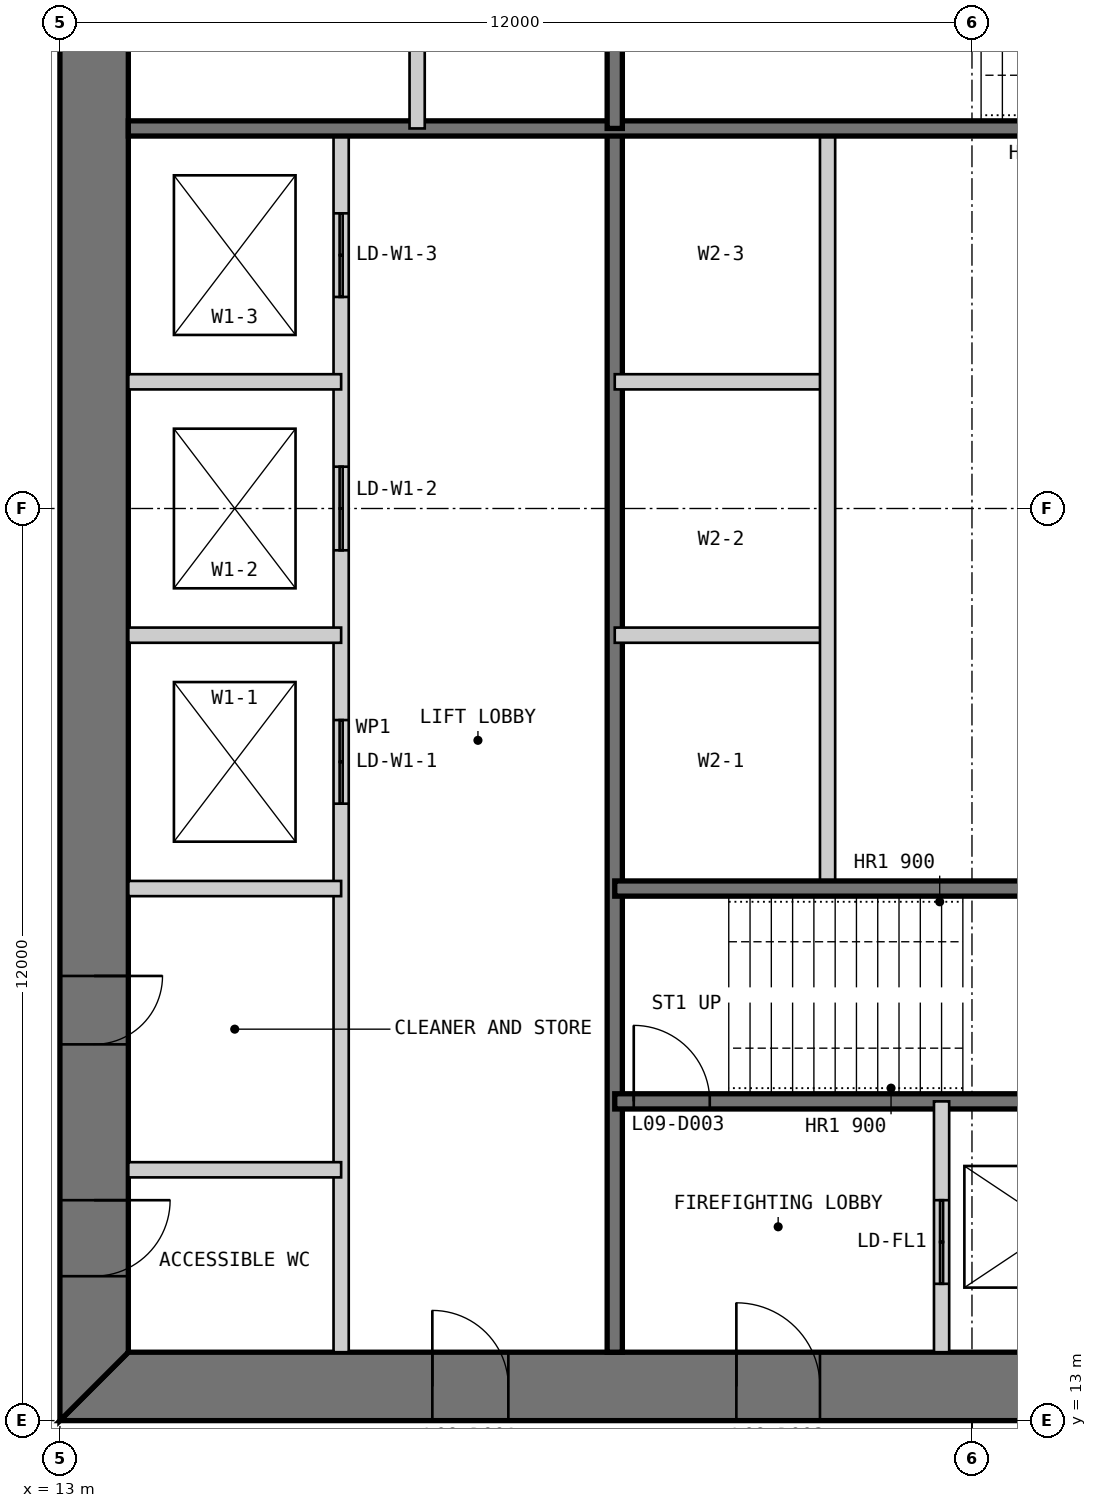
"""IFC4 building model, lengths in metres.
Left out: names, types, materials, properties, quantities, classifications, styles, units other than length and angle.
Written with IfcOpenShell. Run it as: python <this file> out.ifc"""

import sys

from ifc_helpers import new_model, si_unit, direction, frame, frame_2d, origin, place, context, subcontext, project, spatial, polyline, rectangle, outline, extrude, element, fill, save


model = new_model("IFC4")
c1 = context("Model", 3, precision=1e-05, world=origin(), true_north=direction((0.0, 1.0)))
c2 = subcontext(c1, "Body", "Model", "MODEL_VIEW")
j1 = project(units=[si_unit("LENGTHUNIT", "METRE"), si_unit("PLANEANGLEUNIT", "RADIAN")], contexts=[c1])
p1 = place(None, origin())
s1 = spatial("IfcSite", under=j1, at=p1, CompositionType="ELEMENT")
p2 = place(p1, origin())
s2 = spatial("IfcBuilding", under=s1, at=p2, CompositionType="ELEMENT")
p3 = place(p2, frame((0.0, 0.0, 43.0)))
s3 = spatial("IfcBuildingStorey", under=s2, at=p3, CompositionType="ELEMENT", Elevation=43.0)
p4 = place(p3, frame((13.0, 13.45, 0.0), z_axis=(0.0, 0.0, 1.0), x_axis=(1.0, 0.0, 0.0)))
e1 = element("IfcWall", 1, at=p4, inside=s3, PredefinedType="SHEAR", context=c2, shape_type="SweptSolid", body=[
    extrude(outline(polyline([(0.0, -0.45), (24.0, -0.45), (23.1, 0.45), (0.9, 0.45), (0.0, -0.45)])), origin(), (0.0, 0.0, 1.0), 4.0),
])
p5 = place(p4, frame((4.9, 0.0, 0.0)))
e2 = element("IfcOpeningElement", 2, at=p5, cuts=e1, PredefinedType="OPENING", context=c2, shape_type="SweptSolid", body=[
    extrude(rectangle(XDim=1.0, YDim=2.2, at=frame_2d((0.5, 1.1))), frame((0.0, 0.46, 0.0), z_axis=(0.0, -1.0, 0.0), x_axis=(1.0, 0.0, 0.0)), (0.0, 0.0, 1.0), 0.92),
])
p6 = place(p4, frame((8.9, 0.0, 0.0)))
e3 = element("IfcOpeningElement", 3, at=p6, cuts=e1, PredefinedType="OPENING", context=c2, shape_type="SweptSolid", body=[
    extrude(rectangle(XDim=1.1, YDim=2.2, at=frame_2d((0.55, 1.1))), frame((0.0, 0.46, 0.0), z_axis=(0.0, -1.0, 0.0), x_axis=(1.0, 0.0, 0.0)), (0.0, 0.0, 1.0), 0.92),
])
p7 = place(p4, frame((15.05, 0.0, 0.0)))
e4 = element("IfcOpeningElement", 4, at=p7, cuts=e1, PredefinedType="OPENING", context=c2, shape_type="SweptSolid", body=[
    extrude(rectangle(XDim=0.9, YDim=2.2, at=frame_2d((0.45, 1.1))), frame((0.0, 0.46, 0.0), z_axis=(0.0, -1.0, 0.0), x_axis=(1.0, 0.0, 0.0)), (0.0, 0.0, 1.0), 0.92),
])
p8 = place(p4, frame((17.9, 0.0, 0.0)))
e5 = element("IfcOpeningElement", 5, at=p8, cuts=e1, PredefinedType="OPENING", context=c2, shape_type="SweptSolid", body=[
    extrude(rectangle(XDim=1.0, YDim=2.2, at=frame_2d((0.5, 1.1))), frame((0.0, 0.46, 0.0), z_axis=(0.0, -1.0, 0.0), x_axis=(1.0, 0.0, 0.0)), (0.0, 0.0, 1.0), 0.92),
])
p9 = place(p4, frame((21.4, 0.0, 0.0)))
e6 = element("IfcOpeningElement", 6, at=p9, cuts=e1, PredefinedType="OPENING", context=c2, shape_type="SweptSolid", body=[
    extrude(rectangle(XDim=1.0, YDim=2.2, at=frame_2d((0.5, 1.1))), frame((0.0, 0.46, 0.0), z_axis=(0.0, -1.0, 0.0), x_axis=(1.0, 0.0, 0.0)), (0.0, 0.0, 1.0), 0.92),
])
p10 = place(p3, frame((13.45, 36.1, 0.0), z_axis=(0.0, 0.0, 1.0), x_axis=(0.0, -1.0, 0.0)))
e7 = element("IfcWall", 7, at=p10, inside=s3, PredefinedType="SHEAR", context=c2, shape_type="SweptSolid", body=[
    extrude(outline(polyline([(-0.9, -0.45), (23.1, -0.45), (22.2, 0.45), (0.0, 0.45), (-0.9, -0.45)])), origin(), (0.0, 0.0, 1.0), 4.0),
])
p11 = place(p10, frame((20.2, 0.0, 0.0)))
e8 = element("IfcOpeningElement", 8, at=p11, cuts=e7, PredefinedType="OPENING", context=c2, shape_type="SweptSolid", body=[
    extrude(rectangle(XDim=1.0, YDim=2.2, at=frame_2d((0.5, 1.1))), frame((0.0, 0.46, 0.0), z_axis=(0.0, -1.0, 0.0), x_axis=(1.0, 0.0, 0.0)), (0.0, 0.0, 1.0), 0.92),
])
p12 = place(p10, frame((17.25, 0.0, 0.0)))
e9 = element("IfcOpeningElement", 9, at=p12, cuts=e7, PredefinedType="OPENING", context=c2, shape_type="SweptSolid", body=[
    extrude(rectangle(XDim=0.9, YDim=2.2, at=frame_2d((0.45, 1.1))), frame((0.0, 0.46, 0.0), z_axis=(0.0, -1.0, 0.0), x_axis=(1.0, 0.0, 0.0)), (0.0, 0.0, 1.0), 0.92),
])
p13 = place(p3, frame((16.7, 13.9, 0.0), z_axis=(0.0, 0.0, 1.0), x_axis=(0.0, 1.0, 0.0)))
e10 = element("IfcWall", 10, at=p13, inside=s3, PredefinedType="PARTITIONING", context=c2, shape_type="SweptSolid", body=[
    extrude(rectangle(XDim=16.1, YDim=0.2, at=frame_2d((8.05, 0.0))), origin(), (0.0, 0.0, 1.0), 3.8),
])
p14 = place(p13, frame((7.217, 0.0, 0.0)))
e11 = element("IfcOpeningElement", 11, at=p14, cuts=e10, PredefinedType="OPENING", context=c2, shape_type="SweptSolid", body=[
    extrude(rectangle(XDim=1.1, YDim=2.2, at=frame_2d((0.55, 1.1))), frame((0.0, 0.11, 0.0), z_axis=(0.0, -1.0, 0.0), x_axis=(1.0, 0.0, 0.0)), (0.0, 0.0, 1.0), 0.22),
])
p15 = place(p13, frame((10.55, 0.0, 0.0)))
e12 = element("IfcOpeningElement", 12, at=p15, cuts=e10, PredefinedType="OPENING", context=c2, shape_type="SweptSolid", body=[
    extrude(rectangle(XDim=1.1, YDim=2.2, at=frame_2d((0.55, 1.1))), frame((0.0, 0.11, 0.0), z_axis=(0.0, -1.0, 0.0), x_axis=(1.0, 0.0, 0.0)), (0.0, 0.0, 1.0), 0.22),
])
p16 = place(p13, frame((13.883, 0.0, 0.0)))
e13 = element("IfcOpeningElement", 13, at=p16, cuts=e10, PredefinedType="OPENING", context=c2, shape_type="SweptSolid", body=[
    extrude(rectangle(XDim=1.1, YDim=2.2, at=frame_2d((0.55, 1.1))), frame((0.0, 0.11, 0.0), z_axis=(0.0, -1.0, 0.0), x_axis=(1.0, 0.0, 0.0)), (0.0, 0.0, 1.0), 0.22),
])
p17 = place(p3, frame((20.3, 13.9, 0.0), z_axis=(0.0, 0.0, 1.0), x_axis=(0.0, 1.0, 0.0)))
e14 = element("IfcWall", 14, at=p17, inside=s3, PredefinedType="SOLIDWALL", context=c2, shape_type="SweptSolid", body=[
    extrude(rectangle(XDim=16.1, YDim=0.2, at=frame_2d((8.05, 0.0))), origin(), (0.0, 0.0, 1.0), 3.8),
])
for number, where, z_axis, x_axis in (
    (15, (13.9, 20.0, 0.0), (0.0, 0.0, 1.0), (1.0, 0.0, 0.0)),
    (16, (13.9, 23.333, 0.0), (0.0, 0.0, 1.0), (1.0, 0.0, 0.0)),
    (17, (13.9, 26.667, 0.0), (0.0, 0.0, 1.0), (1.0, 0.0, 0.0)),
    (18, (20.3, 23.333, 0.0), (0.0, 0.0, 1.0), (1.0, 0.0, 0.0)),
    (19, (20.3, 26.667, 0.0), (0.0, 0.0, 1.0), (1.0, 0.0, 0.0)),
):
    element("IfcWall", number, at=place(p3, frame(where, z_axis=z_axis, x_axis=x_axis)), inside=s3, PredefinedType="PARTITIONING", context=c2, shape_type="SweptSolid", body=[
        extrude(rectangle(XDim=2.8, YDim=0.2, at=frame_2d((1.4, 0.0))), origin(), (0.0, 0.0, 1.0), 3.8),
    ])
p18 = place(p3, frame((23.1, 20.0, 0.0), z_axis=(0.0, 0.0, 1.0), x_axis=(0.0, 1.0, 0.0)))
e20 = element("IfcWall", 20, at=p18, inside=s3, PredefinedType="PARTITIONING", context=c2, shape_type="SweptSolid", body=[
    extrude(rectangle(XDim=10.0, YDim=0.2, at=frame_2d((5.0, 0.0))), origin(), (0.0, 0.0, 1.0), 3.8),
])
p19 = place(p3, frame((20.3, 17.2, 0.0), z_axis=(0.0, 0.0, 1.0), x_axis=(1.0, 0.0, 0.0)))
e21 = element("IfcWall", 21, at=p19, inside=s3, PredefinedType="SOLIDWALL", context=c2, shape_type="SweptSolid", body=[
    extrude(rectangle(XDim=9.4, YDim=0.2, at=frame_2d((4.7, 0.0))), origin(), (0.0, 0.0, 1.0), 3.8),
])
p20 = place(p19, frame((0.25, 0.0, 0.0)))
e22 = element("IfcOpeningElement", 22, at=p20, cuts=e21, PredefinedType="OPENING", context=c2, shape_type="SweptSolid", body=[
    extrude(rectangle(XDim=1.0, YDim=2.2, at=frame_2d((0.5, 1.1))), frame((0.0, 0.11, 0.0), z_axis=(0.0, -1.0, 0.0), x_axis=(1.0, 0.0, 0.0)), (0.0, 0.0, 1.0), 0.22),
])
p21 = place(p3, frame((20.3, 20.0, 0.0), z_axis=(0.0, 0.0, 1.0), x_axis=(1.0, 0.0, 0.0)))
e23 = element("IfcWall", 23, at=p21, inside=s3, PredefinedType="SOLIDWALL", context=c2, shape_type="SweptSolid", body=[
    extrude(rectangle(XDim=15.8, YDim=0.2, at=frame_2d((7.9, 0.0))), origin(), (0.0, 0.0, 1.0), 3.8),
])
p22 = place(p3, frame((24.6, 13.9, 0.0), z_axis=(0.0, 0.0, 1.0), x_axis=(0.0, 1.0, 0.0)))
e24 = element("IfcWall", 24, at=p22, inside=s3, PredefinedType="PARTITIONING", context=c2, shape_type="SweptSolid", body=[
    extrude(rectangle(XDim=3.3, YDim=0.2, at=frame_2d((1.65, 0.0))), origin(), (0.0, 0.0, 1.0), 3.8),
])
p23 = place(p22, frame((0.9, 0.0, 0.0)))
e25 = element("IfcOpeningElement", 25, at=p23, cuts=e24, PredefinedType="OPENING", context=c2, shape_type="SweptSolid", body=[
    extrude(rectangle(XDim=1.1, YDim=2.2, at=frame_2d((0.55, 1.1))), frame((0.0, 0.11, 0.0), z_axis=(0.0, -1.0, 0.0), x_axis=(1.0, 0.0, 0.0)), (0.0, 0.0, 1.0), 0.22),
])
p24 = place(p3, frame((13.9, 16.3, 0.0), z_axis=(0.0, 0.0, 1.0), x_axis=(1.0, 0.0, 0.0)))
e26 = element("IfcWall", 26, at=p24, inside=s3, PredefinedType="PARTITIONING", context=c2, shape_type="SweptSolid", body=[
    extrude(rectangle(XDim=2.8, YDim=0.2, at=frame_2d((1.4, 0.0))), origin(), (0.0, 0.0, 1.0), 3.8),
])
p25 = place(p3, frame((29.7, 30.0, 0.0), z_axis=(0.0, 0.0, 1.0), x_axis=(-1.0, 0.0, 0.0)))
e27 = element("IfcWall", 27, at=p25, inside=s3, PredefinedType="SOLIDWALL", context=c2, shape_type="SweptSolid", body=[
    extrude(rectangle(XDim=15.8, YDim=0.2, at=frame_2d((7.9, 0.0))), origin(), (0.0, 0.0, 1.0), 3.8),
])
p26 = place(p3, frame((20.3, 36.1, 0.0), z_axis=(0.0, 0.0, 1.0), x_axis=(0.0, -1.0, 0.0)))
e28 = element("IfcWall", 28, at=p26, inside=s3, PredefinedType="SOLIDWALL", context=c2, shape_type="SweptSolid", body=[
    extrude(rectangle(XDim=6.1, YDim=0.2, at=frame_2d((3.05, 0.0))), origin(), (0.0, 0.0, 1.0), 3.8),
])
p27 = place(p3, frame((17.7, 36.1, 0.0), z_axis=(0.0, 0.0, 1.0), x_axis=(0.0, -1.0, 0.0)))
e29 = element("IfcWall", 29, at=p27, inside=s3, PredefinedType="PARTITIONING", context=c2, shape_type="SweptSolid", body=[
    extrude(rectangle(XDim=6.1, YDim=0.2, at=frame_2d((3.05, 0.0))), origin(), (0.0, 0.0, 1.0), 3.8),
])
p28 = place(p5, origin())
e30 = element("IfcDoor", 30, at=p28, inside=s3, OperationType="SINGLE_SWING_LEFT", PredefinedType="DOOR", context=c2, shape_type="SweptSolid", body=[
    extrude(rectangle(XDim=1.0, YDim=2.2, at=frame_2d((0.5, 1.1))), frame((0.0, 0.025, 0.0), z_axis=(0.0, -1.0, 0.0), x_axis=(1.0, 0.0, 0.0)), (0.0, 0.0, 1.0), 0.05),
    extrude(outline(polyline([(0.0, 0.0), (0.04, 0.0), (0.04, 2.16), (0.96, 2.16), (0.96, 0.0), (1.0, 0.0), (1.0, 2.2), (0.0, 2.2), (0.0, 0.0)])), frame((0.0, 0.3, 0.0), z_axis=(0.0, -1.0, 0.0), x_axis=(1.0, 0.0, 0.0)), (0.0, 0.0, 1.0), 0.6),
])
fill(e2, e30)
p29 = place(p6, origin())
e31 = element("IfcDoor", 31, at=p29, inside=s3, OperationType="SINGLE_SWING_LEFT", PredefinedType="DOOR", context=c2, shape_type="SweptSolid", body=[
    extrude(rectangle(XDim=1.1, YDim=2.2, at=frame_2d((0.55, 1.1))), frame((0.0, 0.025, 0.0), z_axis=(0.0, -1.0, 0.0), x_axis=(1.0, 0.0, 0.0)), (0.0, 0.0, 1.0), 0.05),
    extrude(outline(polyline([(0.0, 0.0), (0.04, 0.0), (0.04, 2.16), (1.06, 2.16), (1.06, 0.0), (1.1, 0.0), (1.1, 2.2), (0.0, 2.2), (0.0, 0.0)])), frame((0.0, 0.3, 0.0), z_axis=(0.0, -1.0, 0.0), x_axis=(1.0, 0.0, 0.0)), (0.0, 0.0, 1.0), 0.6),
])
fill(e3, e31)
p30 = place(p20, origin())
e32 = element("IfcDoor", 32, at=p30, inside=s3, OperationType="SINGLE_SWING_LEFT", PredefinedType="DOOR", context=c2, shape_type="SweptSolid", body=[
    extrude(rectangle(XDim=1.0, YDim=2.2, at=frame_2d((0.5, 1.1))), frame((0.0, 0.025, 0.0), z_axis=(0.0, -1.0, 0.0), x_axis=(1.0, 0.0, 0.0)), (0.0, 0.0, 1.0), 0.05),
])
fill(e22, e32)
p31 = place(p11, origin())
e33 = element("IfcDoor", 33, at=p31, inside=s3, OperationType="SINGLE_SWING_LEFT", PredefinedType="DOOR", context=c2, shape_type="SweptSolid", body=[
    extrude(rectangle(XDim=1.0, YDim=2.2, at=frame_2d((0.5, 1.1))), frame((0.0, 0.025, 0.0), z_axis=(0.0, -1.0, 0.0), x_axis=(1.0, 0.0, 0.0)), (0.0, 0.0, 1.0), 0.05),
    extrude(outline(polyline([(0.0, 0.0), (0.04, 0.0), (0.04, 2.16), (0.96, 2.16), (0.96, 0.0), (1.0, 0.0), (1.0, 2.2), (0.0, 2.2), (0.0, 0.0)])), frame((0.0, 0.3, 0.0), z_axis=(0.0, -1.0, 0.0), x_axis=(1.0, 0.0, 0.0)), (0.0, 0.0, 1.0), 0.6),
])
fill(e8, e33)
p32 = place(p12, origin())
e34 = element("IfcDoor", 34, at=p32, inside=s3, OperationType="SINGLE_SWING_LEFT", PredefinedType="DOOR", context=c2, shape_type="SweptSolid", body=[
    extrude(rectangle(XDim=0.9, YDim=2.2, at=frame_2d((0.45, 1.1))), frame((0.0, 0.025, 0.0), z_axis=(0.0, -1.0, 0.0), x_axis=(1.0, 0.0, 0.0)), (0.0, 0.0, 1.0), 0.05),
    extrude(outline(polyline([(0.0, 0.0), (0.04, 0.0), (0.04, 2.16), (0.86, 2.16), (0.86, 0.0), (0.9, 0.0), (0.9, 2.2), (0.0, 2.2), (0.0, 0.0)])), frame((0.0, 0.3, 0.0), z_axis=(0.0, -1.0, 0.0), x_axis=(1.0, 0.0, 0.0)), (0.0, 0.0, 1.0), 0.6),
])
fill(e9, e34)
p33 = place(p23, origin())
e35 = element("IfcDoor", 35, at=p33, inside=s3, OperationType="DOUBLE_DOOR_SLIDING", PredefinedType="DOOR", context=c2, shape_type="SweptSolid", body=[
    extrude(rectangle(XDim=1.1, YDim=2.2, at=frame_2d((0.55, 1.1))), frame((0.0, 0.025, 0.0), z_axis=(0.0, -1.0, 0.0), x_axis=(1.0, 0.0, 0.0)), (0.0, 0.0, 1.0), 0.05),
])
fill(e25, e35)
p34 = place(p14, origin())
e36 = element("IfcDoor", 36, at=p34, inside=s3, OperationType="DOUBLE_DOOR_SLIDING", PredefinedType="DOOR", context=c2, shape_type="SweptSolid", body=[
    extrude(rectangle(XDim=1.1, YDim=2.2, at=frame_2d((0.55, 1.1))), frame((0.0, 0.025, 0.0), z_axis=(0.0, -1.0, 0.0), x_axis=(1.0, 0.0, 0.0)), (0.0, 0.0, 1.0), 0.05),
])
fill(e11, e36)
p35 = place(p15, origin())
e37 = element("IfcDoor", 37, at=p35, inside=s3, OperationType="DOUBLE_DOOR_SLIDING", PredefinedType="DOOR", context=c2, shape_type="SweptSolid", body=[
    extrude(rectangle(XDim=1.1, YDim=2.2, at=frame_2d((0.55, 1.1))), frame((0.0, 0.025, 0.0), z_axis=(0.0, -1.0, 0.0), x_axis=(1.0, 0.0, 0.0)), (0.0, 0.0, 1.0), 0.05),
])
fill(e12, e37)
p36 = place(p16, origin())
e38 = element("IfcDoor", 38, at=p36, inside=s3, OperationType="DOUBLE_DOOR_SLIDING", PredefinedType="DOOR", context=c2, shape_type="SweptSolid", body=[
    extrude(rectangle(XDim=1.1, YDim=2.2, at=frame_2d((0.55, 1.1))), frame((0.0, 0.025, 0.0), z_axis=(0.0, -1.0, 0.0), x_axis=(1.0, 0.0, 0.0)), (0.0, 0.0, 1.0), 0.05),
])
fill(e13, e38)
save(model, sys.argv[1])
